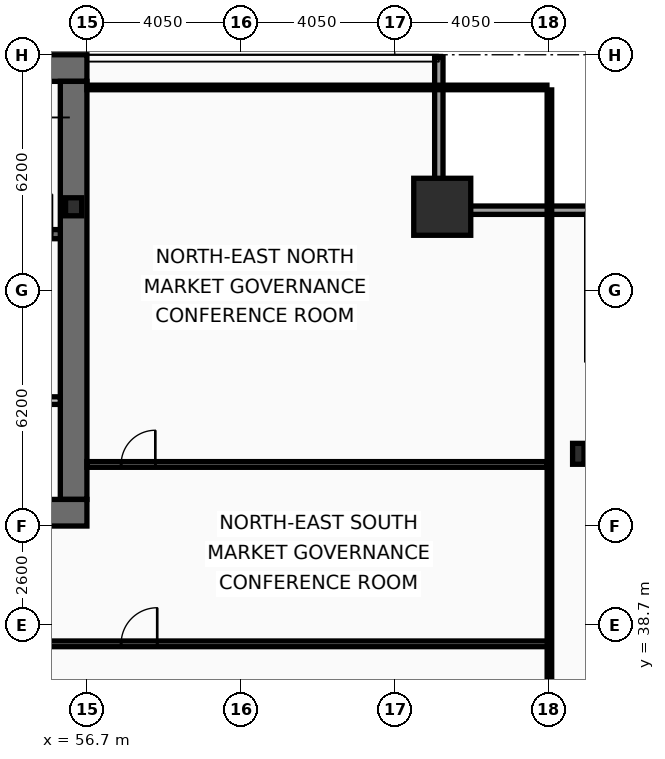
"""IFC4 building model, lengths in metres.
Left out: names, types, materials, properties, quantities, classifications, styles, units other than length and angle.
Written with IfcOpenShell. Run it as: python <this file> out.ifc"""

import sys

from ifc_helpers import new_model, si_unit, direction, frame, frame_2d, origin, origin_2d, place, context, subcontext, project, spatial, rectangle, hollow_rectangle, i_section, extrude, element, fill, save


model = new_model("IFC4")
c1 = context("Model", 3, precision=1e-05, world=origin(), true_north=direction((0.0, 1.0)))
c2 = subcontext(c1, "Body", "Model", "MODEL_VIEW")
j1 = project(units=[si_unit("LENGTHUNIT", "METRE"), si_unit("PLANEANGLEUNIT", "RADIAN")], contexts=[c1])
p1 = place(None, origin())
s1 = spatial("IfcSite", under=j1, at=p1, CompositionType="ELEMENT")
p2 = place(p1, origin())
s2 = spatial("IfcBuilding", under=s1, at=p2, CompositionType="ELEMENT")
p3 = place(p2, frame((0.0, 0.0, 102.6)))
s3 = spatial("IfcBuildingStorey", under=s2, at=p3, CompositionType="ELEMENT", Elevation=102.6)
p4 = place(p3, frame((16.2, 53.35, 0.0), z_axis=(0.0, 0.0, 1.0), x_axis=(1.0, 0.0, 0.0)))
e1 = element("IfcWall", 1, at=p4, inside=s3, PredefinedType="SHEAR", context=c2, shape_type="SweptSolid", body=[
    extrude(rectangle(XDim=40.5, YDim=0.7, at=frame_2d((20.25, 0.0))), origin(), (0.0, 0.0, 1.0), 3.8),
])
p5 = place(p3, frame((56.35, 53.0, 0.0), z_axis=(0.0, 0.0, 1.0), x_axis=(0.0, -1.0, 0.0)))
e2 = element("IfcWall", 2, at=p5, inside=s3, PredefinedType="SHEAR", context=c2, shape_type="SweptSolid", body=[
    extrude(rectangle(XDim=11.0, YDim=0.7, at=frame_2d((5.5, 0.0))), origin(), (0.0, 0.0, 1.0), 3.8),
])
p6 = place(p3, frame((56.7, 41.65, 0.0), z_axis=(0.0, 0.0, 1.0), x_axis=(-1.0, 0.0, 0.0)))
e3 = element("IfcWall", 3, at=p6, inside=s3, PredefinedType="SHEAR", context=c2, shape_type="SweptSolid", body=[
    extrude(rectangle(XDim=2.45, YDim=0.7, at=frame_2d((1.225, 0.0))), origin(), (0.0, 0.0, 1.0), 3.8),
])
p7 = place(p3, frame((48.63, 48.98, 0.0), z_axis=(0.0, 0.0, 1.0), x_axis=(1.0, 0.0, 0.0)))
e4 = element("IfcWall", 4, at=p7, inside=s3, PredefinedType="SHEAR", context=c2, shape_type="SweptSolid", body=[
    extrude(rectangle(XDim=7.37, YDim=0.24, at=frame_2d((3.685, 0.0))), origin(), (0.0, 0.0, 1.0), 3.8),
])
p8 = place(p7, frame((6.1, 0.0, 0.0)))
e5 = element("IfcOpeningElement", 5, at=p8, cuts=e4, PredefinedType="OPENING", context=c2, shape_type="SweptSolid", body=[
    extrude(rectangle(XDim=1.05, YDim=2.15, at=frame_2d((0.525, 1.075))), frame((0.0, 0.13, 0.0), z_axis=(0.0, -1.0, 0.0), x_axis=(1.0, 0.0, 0.0)), (0.0, 0.0, 1.0), 0.26),
])
p9 = place(p3, frame((66.05, 49.7, 0.0), z_axis=(0.0, 0.0, 1.0), x_axis=(1.0, 0.0, 0.0)))
e6 = element("IfcColumn", 6, at=p9, inside=s3, PredefinedType="COLUMN", context=c2, shape_type="SweptSolid", body=[
    extrude(hollow_rectangle(XDim=1.5, YDim=1.5, WallThickness=0.07, at=origin_2d()), origin(), (0.0, 0.0, 1.0), 4.0),
])
p10 = place(p3, frame((69.63, 43.2, 0.0), z_axis=(0.0, 0.0, 1.0), x_axis=(1.0, 0.0, 0.0)))
e7 = element("IfcColumn", 7, at=p10, inside=s3, PredefinedType="COLUMN", context=c2, shape_type="SweptSolid", body=[
    extrude(i_section(OverallWidth=0.3, OverallDepth=0.55, WebThickness=0.015, FlangeThickness=0.029, at=origin_2d()), origin(), (0.0, 0.0, 1.0), 4.0),
])
p11 = place(p3, frame((56.35, 49.7, 0.0), z_axis=(0.0, 0.0, 1.0), x_axis=(1.0, 0.0, 0.0)))
e8 = element("IfcColumn", 8, at=p11, inside=s3, PredefinedType="COLUMN", context=c2, shape_type="SweptSolid", body=[
    extrude(i_section(OverallWidth=0.424, OverallDepth=0.474, WebThickness=0.048, FlangeThickness=0.077, at=origin_2d()), origin(), (0.0, 0.0, 1.0), 4.0),
])
p12 = place(p3, frame((65.96, 53.63, 0.0), z_axis=(0.0, 0.0, 1.0), x_axis=(0.0, -1.0, 0.0)))
e9 = element("IfcWall", 9, at=p12, inside=s3, PredefinedType="SOLIDWALL", context=c2, shape_type="SweptSolid", body=[
    extrude(rectangle(XDim=3.91, YDim=0.22, at=frame_2d((1.955, 0.0))), origin(), (0.0, 0.0, 1.0), 3.14),
])
p13 = place(p3, frame((65.85, 49.61, 0.0), z_axis=(0.0, 0.0, 1.0), x_axis=(1.0, 0.0, 0.0)))
e10 = element("IfcWall", 10, at=p13, inside=s3, PredefinedType="SOLIDWALL", context=c2, shape_type="SweptSolid", body=[
    extrude(rectangle(XDim=4.22, YDim=0.22, at=frame_2d((2.11, 0.0))), origin(), (0.0, 0.0, 1.0), 3.14),
])
p14 = place(p3, frame((51.9, 44.6, 0.0), z_axis=(0.0, 0.0, 1.0), x_axis=(1.0, 0.0, 0.0)))
e11 = element("IfcWall", 11, at=p14, inside=s3, PredefinedType="PARTITIONING", context=c2, shape_type="SweptSolid", body=[
    extrude(rectangle(XDim=4.1, YDim=0.2, at=frame_2d((2.05, 0.0))), origin(), (0.0, 0.0, 1.0), 3.8),
])
p15 = place(p14, frame((1.15, 0.0, 0.0)))
e12 = element("IfcOpeningElement", 12, at=p15, cuts=e11, PredefinedType="OPENING", context=c2, shape_type="SweptSolid", body=[
    extrude(rectangle(XDim=1.05, YDim=2.15, at=frame_2d((0.525, 1.075))), frame((0.0, 0.11, 0.0), z_axis=(0.0, -1.0, 0.0), x_axis=(1.0, 0.0, 0.0)), (0.0, 0.0, 1.0), 0.22),
])
p16 = place(p3, frame((54.35, 38.2, 0.0), z_axis=(0.0, 0.0, 1.0), x_axis=(1.0, 0.0, 0.0)))
e13 = element("IfcWall", 13, at=p16, inside=s3, PredefinedType="PARTITIONING", context=c2, shape_type="SweptSolid", body=[
    extrude(rectangle(XDim=14.52, YDim=0.15, at=frame_2d((7.26, 0.0))), origin(), (0.0, 0.0, 1.0), 2.99),
])
p17 = place(p16, frame((3.25, 0.0, 0.0)))
e14 = element("IfcOpeningElement", 14, at=p17, cuts=e13, PredefinedType="OPENING", context=c2, shape_type="SweptSolid", body=[
    extrude(rectangle(XDim=0.95, YDim=2.05, at=frame_2d((0.475, 1.025))), frame((0.0, 0.085, 0.0), z_axis=(0.0, -1.0, 0.0), x_axis=(1.0, 0.0, 0.0)), (0.0, 0.0, 1.0), 0.17),
])
p18 = place(p3, frame((56.7, 42.92, 0.0), z_axis=(0.0, 0.0, 1.0), x_axis=(1.0, 0.0, 0.0)))
e15 = element("IfcWall", 15, at=p18, inside=s3, PredefinedType="PARTITIONING", context=c2, shape_type="SweptSolid", body=[
    extrude(rectangle(XDim=12.105, YDim=0.15, at=frame_2d((6.052, 0.0))), origin(), (0.0, 0.0, 1.0), 2.99),
])
p19 = place(p18, frame((0.9, 0.0, 0.0)))
e16 = element("IfcOpeningElement", 16, at=p19, cuts=e15, PredefinedType="OPENING", context=c2, shape_type="SweptSolid", body=[
    extrude(rectangle(XDim=0.9, YDim=2.05, at=frame_2d((0.45, 1.025))), frame((0.0, 0.085, 0.0), z_axis=(0.0, -1.0, 0.0), x_axis=(1.0, 0.0, 0.0)), (0.0, 0.0, 1.0), 0.17),
])
p20 = place(p3, frame((68.87, 10.665, 0.0), z_axis=(0.0, 0.0, 1.0), x_axis=(0.0, 1.0, 0.0)))
e17 = element("IfcWall", 17, at=p20, inside=s3, PredefinedType="PARTITIONING", context=c2, shape_type="SweptSolid", body=[
    extrude(rectangle(XDim=42.11, YDim=0.12, at=frame_2d((21.055, 0.0))), origin(), (0.0, 0.0, 1.0), 2.99),
])
p21 = place(p3, frame((56.7, 52.84, 0.0), z_axis=(0.0, 0.0, 1.0), x_axis=(1.0, 0.0, 0.0)))
e18 = element("IfcWall", 18, at=p21, inside=s3, PredefinedType="PARTITIONING", context=c2, shape_type="SweptSolid", body=[
    extrude(rectangle(XDim=12.105, YDim=0.12, at=frame_2d((6.052, 0.0))), origin(), (0.0, 0.0, 1.0), 3.8),
])
p22 = place(p17, origin())
e19 = element("IfcDoor", 19, at=p22, inside=s3, OperationType="SINGLE_SWING_RIGHT", PredefinedType="DOOR", context=c2, shape_type="SweptSolid", body=[
    extrude(rectangle(XDim=0.95, YDim=2.05, at=frame_2d((0.475, 1.025))), frame((0.0, 0.025, 0.0), z_axis=(0.0, -1.0, 0.0), x_axis=(1.0, 0.0, 0.0)), (0.0, 0.0, 1.0), 0.05),
])
fill(e14, e19)
p23 = place(p19, origin())
e20 = element("IfcDoor", 20, at=p23, inside=s3, OperationType="SINGLE_SWING_RIGHT", PredefinedType="DOOR", context=c2, shape_type="SweptSolid", body=[
    extrude(rectangle(XDim=0.9, YDim=2.05, at=frame_2d((0.45, 1.025))), frame((0.0, 0.025, 0.0), z_axis=(0.0, -1.0, 0.0), x_axis=(1.0, 0.0, 0.0)), (0.0, 0.0, 1.0), 0.05),
])
fill(e16, e20)
save(model, sys.argv[1])
